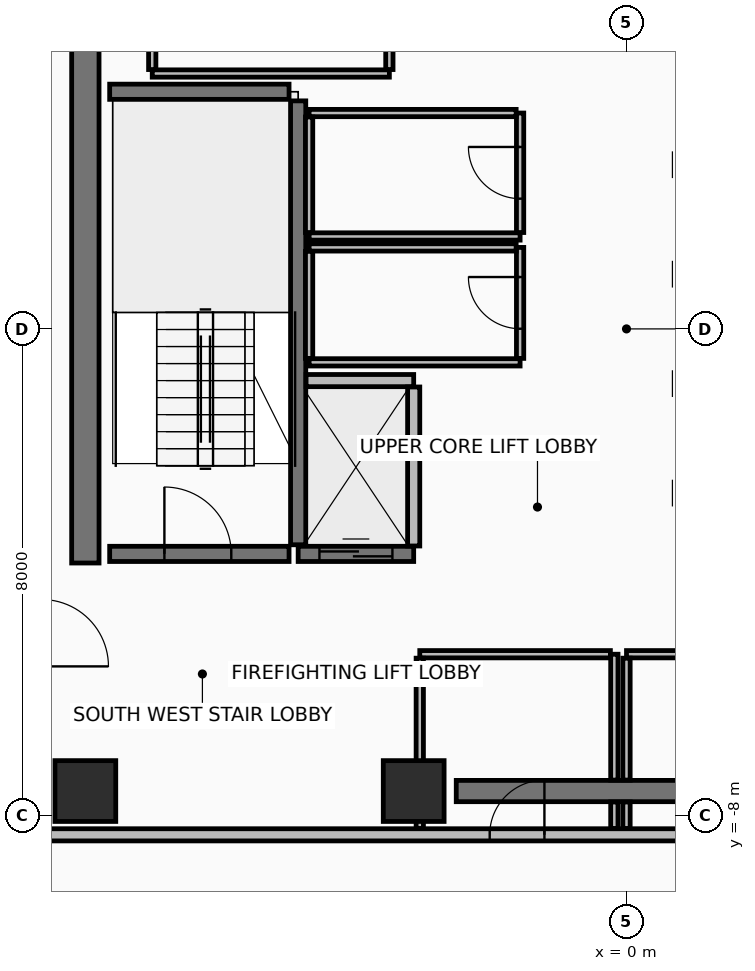
"""IFC4 building model, lengths in metres.
Left out: names, types, materials, properties, quantities, classifications, styles, units other than length and angle.
Written with IfcOpenShell. Run it as: python <this file> out.ifc"""

import sys

from ifc_helpers import new_model, si_unit, direction, frame, frame_2d, origin, origin_2d, place, context, subcontext, project, spatial, rectangle, extrude, element, fill, save


model = new_model("IFC4")
c1 = context("Model", 3, precision=1e-05, world=origin(), true_north=direction((0.0, 1.0)))
c2 = subcontext(c1, "Body", "Model", "MODEL_VIEW")
j1 = project(units=[si_unit("LENGTHUNIT", "METRE"), si_unit("PLANEANGLEUNIT", "RADIAN")], contexts=[c1])
p1 = place(None, origin())
s1 = spatial("IfcSite", under=j1, at=p1, CompositionType="ELEMENT")
p2 = place(p1, origin())
s2 = spatial("IfcBuilding", under=s1, at=p2, CompositionType="ELEMENT")
p3 = place(p2, frame((0.0, 0.0, 227.05)))
s3 = spatial("IfcBuildingStorey", under=s2, at=p3, CompositionType="ELEMENT", Elevation=227.05)
for number, where, z_axis, x_axis in (
    (1, (-8.9, -7.6, 0.0), (0.0, 0.0, 1.0), (1.0, 0.0, 0.0)),
    (2, (-3.5, -7.6, 0.0), (0.0, 0.0, 1.0), (1.0, 0.0, 0.0)),
):
    element("IfcColumn", number, at=place(p3, frame(where, z_axis=z_axis, x_axis=x_axis)), inside=s3, PredefinedType="COLUMN", context=c2, shape_type="SweptSolid", body=[
        extrude(rectangle(XDim=1.0, YDim=1.0, at=origin_2d()), origin(), (0.0, 0.0, 1.0), 3.6),
    ])
p4 = place(p3, frame((-2.8, -7.6, 0.0), z_axis=(0.0, 0.0, 1.0), x_axis=(1.0, 0.0, 0.0)))
e3 = element("IfcWall", 3, at=p4, inside=s3, PredefinedType="SHEAR", context=c2, shape_type="SweptSolid", body=[
    extrude(rectangle(XDim=5.38, YDim=0.35, at=frame_2d((2.69, 0.0))), origin(), (0.0, 0.0, 1.0), 3.42),
])
p5 = place(p3, frame((-8.9, -3.85, 0.0), z_axis=(0.0, 0.0, 1.0), x_axis=(0.0, 1.0, 0.0)))
e4 = element("IfcWall", 4, at=p5, inside=s3, PredefinedType="SHEAR", context=c2, shape_type="SweptSolid", body=[
    extrude(rectangle(XDim=10.7, YDim=0.45, at=frame_2d((5.35, 0.0))), origin(), (0.0, 0.0, 1.0), 3.42),
])
p6 = place(p3, frame((-9.62, -8.32, 0.0), z_axis=(0.0, 0.0, 1.0), x_axis=(1.0, 0.0, 0.0)))
e5 = element("IfcWall", 5, at=p6, inside=s3, PredefinedType="PARTITIONING", context=c2, shape_type="SweptSolid", body=[
    extrude(rectangle(XDim=19.24, YDim=0.2, at=frame_2d((9.62, 0.0))), origin(), (0.0, 0.0, 1.0), 2.915),
])
p7 = place(p6, frame((7.37, 0.0, 0.0)))
e6 = element("IfcOpeningElement", 6, at=p7, cuts=e5, PredefinedType="OPENING", context=c2, shape_type="SweptSolid", body=[
    extrude(rectangle(XDim=0.9, YDim=2.1, at=frame_2d((0.45, 1.05))), frame((0.0, 0.11, 0.0), z_axis=(0.0, -1.0, 0.0), x_axis=(1.0, 0.0, 0.0)), (0.0, 0.0, 1.0), 0.22),
])
p8 = place(p6, frame((10.77, 0.0, 0.0)))
e7 = element("IfcOpeningElement", 7, at=p8, cuts=e5, PredefinedType="OPENING", context=c2, shape_type="SweptSolid", body=[
    extrude(rectangle(XDim=0.9, YDim=2.1, at=frame_2d((0.45, 1.05))), frame((0.0, 0.11, 0.0), z_axis=(0.0, -1.0, 0.0), x_axis=(1.0, 0.0, 0.0)), (0.0, 0.0, 1.0), 0.22),
])
p9 = place(p3, frame((-5.4, -3.55, 0.0), z_axis=(0.0, 0.0, 1.0), x_axis=(0.0, 1.0, 0.0)))
e8 = element("IfcWall", 8, at=p9, inside=s3, PredefinedType="SHEAR", context=c2, shape_type="SweptSolid", body=[
    extrude(rectangle(XDim=7.3, YDim=0.25, at=frame_2d((3.65, 0.0))), origin(), (0.0, 0.0, 1.0), 3.42),
])
p10 = place(p3, frame((-8.5, -3.7, 0.0), z_axis=(0.0, 0.0, 1.0), x_axis=(1.0, 0.0, 0.0)))
e9 = element("IfcWall", 9, at=p10, inside=s3, PredefinedType="SHEAR", context=c2, shape_type="SweptSolid", body=[
    extrude(rectangle(XDim=2.95, YDim=0.25, at=frame_2d((1.475, 0.0))), origin(), (0.0, 0.0, 1.0), 3.42),
])
p11 = place(p10, frame((0.9, 0.0, 0.0)))
e10 = element("IfcOpeningElement", 10, at=p11, cuts=e9, PredefinedType="OPENING", context=c2, shape_type="SweptSolid", body=[
    extrude(rectangle(XDim=1.1, YDim=2.15, at=frame_2d((0.55, 1.075))), frame((0.0, 0.135, 0.0), z_axis=(0.0, -1.0, 0.0), x_axis=(1.0, 0.0, 0.0)), (0.0, 0.0, 1.0), 0.27),
])
p12 = place(p3, frame((-8.5, 3.9, 0.0), z_axis=(0.0, 0.0, 1.0), x_axis=(1.0, 0.0, 0.0)))
e11 = element("IfcWall", 11, at=p12, inside=s3, PredefinedType="SHEAR", context=c2, shape_type="SweptSolid", body=[
    extrude(rectangle(XDim=2.95, YDim=0.25, at=frame_2d((1.475, 0.0))), origin(), (0.0, 0.0, 1.0), 3.42),
])
p13 = place(p3, frame((-5.4, -3.7, 0.0), z_axis=(0.0, 0.0, 1.0), x_axis=(1.0, 0.0, 0.0)))
e12 = element("IfcWall", 12, at=p13, inside=s3, PredefinedType="SHEAR", context=c2, shape_type="SweptSolid", body=[
    extrude(rectangle(XDim=1.9, YDim=0.25, at=frame_2d((0.95, 0.0))), origin(), (0.0, 0.0, 1.0), 3.42),
])
p14 = place(p13, frame((0.35, 0.0, 0.0)))
e13 = element("IfcOpeningElement", 13, at=p14, cuts=e12, PredefinedType="OPENING", context=c2, shape_type="SweptSolid", body=[
    extrude(rectangle(XDim=1.2, YDim=2.2, at=frame_2d((0.6, 1.1))), frame((0.0, 0.135, 0.0), z_axis=(0.0, -1.0, 0.0), x_axis=(1.0, 0.0, 0.0)), (0.0, 0.0, 1.0), 0.27),
])
p15 = place(p3, frame((-5.27, -0.85, 0.0), z_axis=(0.0, 0.0, 1.0), x_axis=(1.0, 0.0, 0.0)))
e14 = element("IfcWall", 14, at=p15, inside=s3, PredefinedType="PARTITIONING", context=c2, shape_type="SweptSolid", body=[
    extrude(rectangle(XDim=1.77, YDim=0.2, at=frame_2d((0.885, 0.0))), origin(), (0.0, 0.0, 1.0), 3.42),
])
p16 = place(p3, frame((-3.5, -3.57, 0.0), z_axis=(0.0, 0.0, 1.0), x_axis=(0.0, 1.0, 0.0)))
e15 = element("IfcWall", 15, at=p16, inside=s3, PredefinedType="PARTITIONING", context=c2, shape_type="SweptSolid", body=[
    extrude(rectangle(XDim=2.615, YDim=0.2, at=frame_2d((1.308, 0.0))), origin(), (0.0, 0.0, 1.0), 3.42),
])
p17 = place(p3, frame((-5.22, 1.52, 0.0), z_axis=(0.0, 0.0, 1.0), x_axis=(1.0, 0.0, 0.0)))
e16 = element("IfcWall", 16, at=p17, inside=s3, PredefinedType="PARTITIONING", context=c2, shape_type="SweptSolid", body=[
    extrude(rectangle(XDim=3.47, YDim=0.12, at=frame_2d((1.735, 0.0))), origin(), (0.0, 0.0, 1.0), 3.42),
])
p18 = place(p3, frame((-1.75, 1.585, 0.0), z_axis=(0.0, 0.0, 1.0), x_axis=(0.0, 1.0, 0.0)))
e17 = element("IfcWall", 17, at=p18, inside=s3, PredefinedType="PARTITIONING", context=c2, shape_type="SweptSolid", body=[
    extrude(rectangle(XDim=1.965, YDim=0.12, at=frame_2d((0.982, 0.0))), origin(), (0.0, 0.0, 1.0), 3.42),
])
p19 = place(p18, frame((0.557, 0.0, 0.0)))
e18 = element("IfcOpeningElement", 18, at=p19, cuts=e17, PredefinedType="OPENING", context=c2, shape_type="SweptSolid", body=[
    extrude(rectangle(XDim=0.85, YDim=2.1, at=frame_2d((0.425, 1.05))), frame((0.0, 0.07, 0.0), z_axis=(0.0, -1.0, 0.0), x_axis=(1.0, 0.0, 0.0)), (0.0, 0.0, 1.0), 0.14),
])
p20 = place(p3, frame((-1.815, 3.55, 0.0), z_axis=(0.0, 0.0, 1.0), x_axis=(-1.0, 0.0, 0.0)))
e19 = element("IfcWall", 19, at=p20, inside=s3, PredefinedType="PARTITIONING", context=c2, shape_type="SweptSolid", body=[
    extrude(rectangle(XDim=3.405, YDim=0.12, at=frame_2d((1.703, 0.0))), origin(), (0.0, 0.0, 1.0), 3.42),
])
p21 = place(p3, frame((-5.22, 3.485, 0.0), z_axis=(0.0, 0.0, 1.0), x_axis=(0.0, -1.0, 0.0)))
e20 = element("IfcWall", 20, at=p21, inside=s3, PredefinedType="PARTITIONING", context=c2, shape_type="SweptSolid", body=[
    extrude(rectangle(XDim=1.9, YDim=0.12, at=frame_2d((0.95, 0.0))), origin(), (0.0, 0.0, 1.0), 3.42),
])
p22 = place(p3, frame((-5.22, -0.55, 0.0), z_axis=(0.0, 0.0, 1.0), x_axis=(1.0, 0.0, 0.0)))
e21 = element("IfcWall", 21, at=p22, inside=s3, PredefinedType="PARTITIONING", context=c2, shape_type="SweptSolid", body=[
    extrude(rectangle(XDim=3.47, YDim=0.12, at=frame_2d((1.735, 0.0))), origin(), (0.0, 0.0, 1.0), 3.42),
])
p23 = place(p3, frame((-1.75, -0.485, 0.0), z_axis=(0.0, 0.0, 1.0), x_axis=(0.0, 1.0, 0.0)))
e22 = element("IfcWall", 22, at=p23, inside=s3, PredefinedType="PARTITIONING", context=c2, shape_type="SweptSolid", body=[
    extrude(rectangle(XDim=1.825, YDim=0.12, at=frame_2d((0.913, 0.0))), origin(), (0.0, 0.0, 1.0), 3.42),
])
p24 = place(p23, frame((0.488, 0.0, 0.0)))
e23 = element("IfcOpeningElement", 23, at=p24, cuts=e22, PredefinedType="OPENING", context=c2, shape_type="SweptSolid", body=[
    extrude(rectangle(XDim=0.85, YDim=2.1, at=frame_2d((0.425, 1.05))), frame((0.0, 0.07, 0.0), z_axis=(0.0, -1.0, 0.0), x_axis=(1.0, 0.0, 0.0)), (0.0, 0.0, 1.0), 0.14),
])
p25 = place(p3, frame((-1.815, 1.34, 0.0), z_axis=(0.0, 0.0, 1.0), x_axis=(-1.0, 0.0, 0.0)))
e24 = element("IfcWall", 24, at=p25, inside=s3, PredefinedType="PARTITIONING", context=c2, shape_type="SweptSolid", body=[
    extrude(rectangle(XDim=3.405, YDim=0.12, at=frame_2d((1.703, 0.0))), origin(), (0.0, 0.0, 1.0), 3.42),
])
p26 = place(p3, frame((-5.22, 1.275, 0.0), z_axis=(0.0, 0.0, 1.0), x_axis=(0.0, -1.0, 0.0)))
e25 = element("IfcWall", 25, at=p26, inside=s3, PredefinedType="PARTITIONING", context=c2, shape_type="SweptSolid", body=[
    extrude(rectangle(XDim=1.76, YDim=0.12, at=frame_2d((0.88, 0.0))), origin(), (0.0, 0.0, 1.0), 3.42),
])
p27 = place(p3, frame((-0.2, -8.215, 0.0), z_axis=(0.0, 0.0, 1.0), x_axis=(0.0, 1.0, 0.0)))
e26 = element("IfcWall", 26, at=p27, inside=s3, PredefinedType="PARTITIONING", context=c2, shape_type="SweptSolid", body=[
    extrude(rectangle(XDim=0.435, YDim=0.12, at=frame_2d((0.218, 0.0))), origin(), (0.0, 0.0, 1.0), 2.715),
])
p28 = place(p3, frame((-0.2, -7.42, 0.0), z_axis=(0.0, 0.0, 1.0), x_axis=(0.0, 1.0, 0.0)))
e27 = element("IfcWall", 27, at=p28, inside=s3, PredefinedType="PARTITIONING", context=c2, shape_type="SweptSolid", body=[
    extrude(rectangle(XDim=2.07, YDim=0.12, at=frame_2d((1.035, 0.0))), origin(), (0.0, 0.0, 1.0), 2.715),
])
p29 = place(p3, frame((-0.265, -5.35, 0.0), z_axis=(0.0, 0.0, 1.0), x_axis=(-1.0, 0.0, 0.0)))
e28 = element("IfcWall", 28, at=p29, inside=s3, PredefinedType="PARTITIONING", context=c2, shape_type="SweptSolid", body=[
    extrude(rectangle(XDim=3.135, YDim=0.12, at=frame_2d((1.567, 0.0))), origin(), (0.0, 0.0, 1.0), 2.715),
])
p30 = place(p3, frame((-3.4, -5.415, 0.0), z_axis=(0.0, 0.0, 1.0), x_axis=(0.0, -1.0, 0.0)))
e29 = element("IfcWall", 29, at=p30, inside=s3, PredefinedType="PARTITIONING", context=c2, shape_type="SweptSolid", body=[
    extrude(rectangle(XDim=2.8, YDim=0.12, at=frame_2d((1.4, 0.0))), origin(), (0.0, 0.0, 1.0), 2.715),
])
p31 = place(p3, frame((3.135, -5.35, 0.0), z_axis=(0.0, 0.0, 1.0), x_axis=(-1.0, 0.0, 0.0)))
e30 = element("IfcWall", 30, at=p31, inside=s3, PredefinedType="PARTITIONING", context=c2, shape_type="SweptSolid", body=[
    extrude(rectangle(XDim=3.135, YDim=0.12, at=frame_2d((1.567, 0.0))), origin(), (0.0, 0.0, 1.0), 3.42),
])
p32 = place(p3, frame((0.0, -5.415, 0.0), z_axis=(0.0, 0.0, 1.0), x_axis=(0.0, -1.0, 0.0)))
e31 = element("IfcWall", 31, at=p32, inside=s3, PredefinedType="PARTITIONING", context=c2, shape_type="SweptSolid", body=[
    extrude(rectangle(XDim=2.005, YDim=0.12, at=frame_2d((1.002, 0.0))), origin(), (0.0, 0.0, 1.0), 2.715),
])
p33 = place(p3, frame((0.0, -7.78, 0.0), z_axis=(0.0, 0.0, 1.0), x_axis=(0.0, -1.0, 0.0)))
e32 = element("IfcWall", 32, at=p33, inside=s3, PredefinedType="PARTITIONING", context=c2, shape_type="SweptSolid", body=[
    extrude(rectangle(XDim=0.435, YDim=0.12, at=frame_2d((0.218, 0.0))), origin(), (0.0, 0.0, 1.0), 2.715),
])
p34 = place(p3, frame((-7.8, 4.2, 0.0), z_axis=(0.0, 0.0, 1.0), x_axis=(1.0, 0.0, 0.0)))
e33 = element("IfcWall", 33, at=p34, inside=s3, PredefinedType="PARTITIONING", context=c2, shape_type="SweptSolid", body=[
    extrude(rectangle(XDim=3.9, YDim=0.12, at=frame_2d((1.95, 0.0))), origin(), (0.0, 0.0, 1.0), 3.42),
])
for number, where, z_axis, x_axis in (
    (34, (-3.9, 4.265, 0.0), (0.0, 0.0, 1.0), (0.0, 1.0, 0.0)),
    (35, (-7.8, 8.215, 0.0), (0.0, 0.0, 1.0), (0.0, -1.0, 0.0)),
):
    element("IfcWall", number, at=place(p3, frame(where, z_axis=z_axis, x_axis=x_axis)), inside=s3, PredefinedType="PARTITIONING", context=c2, shape_type="SweptSolid", body=[
        extrude(rectangle(XDim=3.95, YDim=0.12, at=frame_2d((1.975, 0.0))), origin(), (0.0, 0.0, 1.0), 2.715),
    ])
p35 = place(p11, origin())
e36 = element("IfcDoor", 36, at=p35, inside=s3, OperationType="SINGLE_SWING_LEFT", PredefinedType="DOOR", context=c2, shape_type="SweptSolid", body=[
    extrude(rectangle(XDim=1.1, YDim=2.15, at=frame_2d((0.55, 1.075))), frame((0.0, 0.025, 0.0), z_axis=(0.0, -1.0, 0.0), x_axis=(1.0, 0.0, 0.0)), (0.0, 0.0, 1.0), 0.05),
])
fill(e10, e36)
p36 = place(p14, origin())
e37 = element("IfcDoor", 37, at=p36, inside=s3, OperationType="SLIDING_TO_RIGHT", PredefinedType="DOOR", context=c2, shape_type="SweptSolid", body=[
    extrude(rectangle(XDim=1.2, YDim=2.2, at=frame_2d((0.6, 1.1))), frame((0.0, 0.025, 0.0), z_axis=(0.0, -1.0, 0.0), x_axis=(1.0, 0.0, 0.0)), (0.0, 0.0, 1.0), 0.05),
])
fill(e13, e37)
p37 = place(p19, frame((0.85, 0.0, 0.0), z_axis=(0.0, 0.0, 1.0), x_axis=(-1.0, 0.0, 0.0)))
e38 = element("IfcDoor", 38, at=p37, inside=s3, OperationType="SINGLE_SWING_RIGHT", PredefinedType="DOOR", context=c2, shape_type="SweptSolid", body=[
    extrude(rectangle(XDim=0.85, YDim=2.1, at=frame_2d((0.425, 1.05))), frame((0.0, 0.025, 0.0), z_axis=(0.0, -1.0, 0.0), x_axis=(1.0, 0.0, 0.0)), (0.0, 0.0, 1.0), 0.05),
])
fill(e18, e38)
p38 = place(p24, frame((0.85, 0.0, 0.0), z_axis=(0.0, 0.0, 1.0), x_axis=(-1.0, 0.0, 0.0)))
e39 = element("IfcDoor", 39, at=p38, inside=s3, OperationType="SINGLE_SWING_RIGHT", PredefinedType="DOOR", context=c2, shape_type="SweptSolid", body=[
    extrude(rectangle(XDim=0.85, YDim=2.1, at=frame_2d((0.425, 1.05))), frame((0.0, 0.025, 0.0), z_axis=(0.0, -1.0, 0.0), x_axis=(1.0, 0.0, 0.0)), (0.0, 0.0, 1.0), 0.05),
])
fill(e23, e39)
p39 = place(p7, frame((0.9, 0.0, 0.0), z_axis=(0.0, 0.0, 1.0), x_axis=(-1.0, 0.0, 0.0)))
e40 = element("IfcDoor", 40, at=p39, inside=s3, OperationType="SINGLE_SWING_LEFT", PredefinedType="DOOR", context=c2, shape_type="SweptSolid", body=[
    extrude(rectangle(XDim=0.9, YDim=2.1, at=frame_2d((0.45, 1.05))), frame((0.0, 0.025, 0.0), z_axis=(0.0, -1.0, 0.0), x_axis=(1.0, 0.0, 0.0)), (0.0, 0.0, 1.0), 0.05),
])
fill(e6, e40)
save(model, sys.argv[1])
